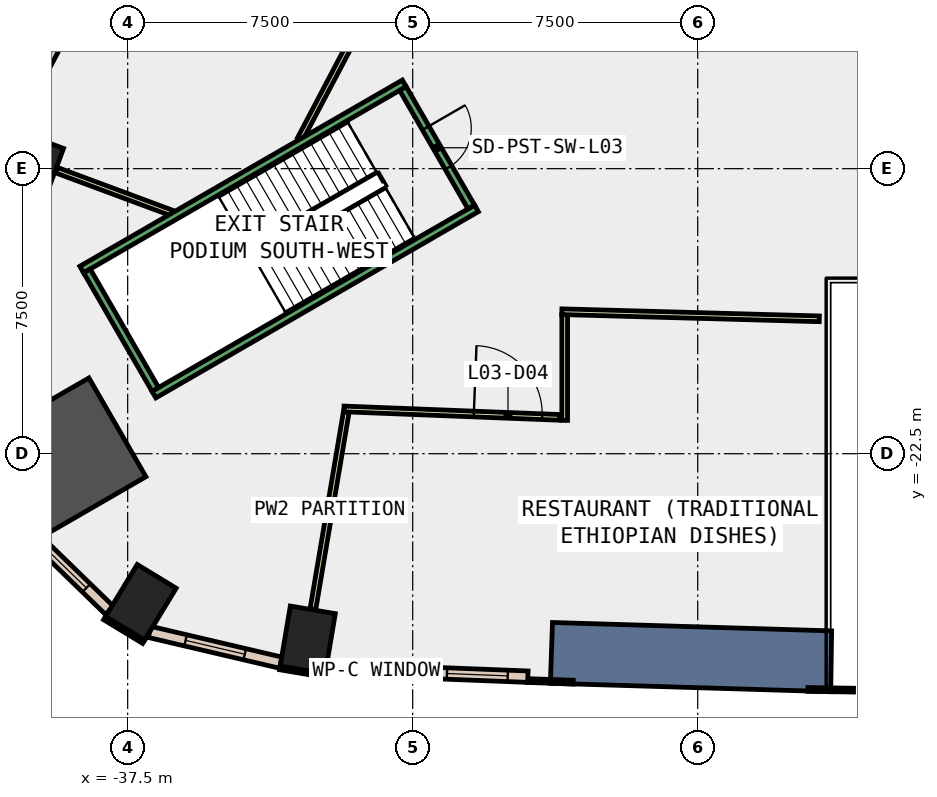
"""IFC4 building model, lengths in metres.
Left out: names, types, materials, properties, quantities, classifications, styles, units other than length and angle.
Written with IfcOpenShell. Run it as: python <this file> out.ifc"""

import sys

from ifc_helpers import new_model, si_unit, direction, frame, frame_2d, origin, origin_2d, place, context, subcontext, project, spatial, polyline, rectangle, outline, extrude, element, fill, save


model = new_model("IFC4")
c1 = context("Model", 3, precision=1e-05, world=origin(), true_north=direction((0.0, 1.0)))
c2 = subcontext(c1, "Body", "Model", "MODEL_VIEW")
j1 = project(units=[si_unit("LENGTHUNIT", "METRE"), si_unit("PLANEANGLEUNIT", "RADIAN")], contexts=[c1])
p1 = place(None, origin())
s1 = spatial("IfcSite", under=j1, at=p1, CompositionType="ELEMENT")
p2 = place(p1, origin())
s2 = spatial("IfcBuilding", under=s1, at=p2, CompositionType="ELEMENT")
p3 = place(p2, frame((0.0, 0.0, 20.0)))
s3 = spatial("IfcBuildingStorey", under=s2, at=p3, CompositionType="ELEMENT", Elevation=20.0)
for number, where, z_axis, x_axis in (
    (1, (-32.761, -27.397, -0.45), (0.0, 0.0, 1.0), (-0.986, 0.167, 0.0)),
    (2, (-40.147, -14.751, -0.45), (0.0, 0.0, 1.0), (0.348, 0.937, 0.0)),
):
    element("IfcColumn", number, at=place(p3, frame(where, z_axis=z_axis, x_axis=x_axis)), inside=s3, PredefinedType="COLUMN", context=c2, shape_type="SweptSolid", body=[
        extrude(rectangle(XDim=1.2, YDim=1.6, at=origin_2d()), origin(), (0.0, 0.0, 1.0), 5.0),
    ])
p4 = place(p3, frame((-39.069, -22.556, -0.45), z_axis=(0.0, 0.0, 1.0), x_axis=(0.866025403784, 0.5, 0.0)))
e3 = element("IfcColumn", 3, at=p4, inside=s3, PredefinedType="COLUMN", context=c2, shape_type="SweptSolid", body=[
    extrude(rectangle(XDim=3.0, YDim=3.0, at=origin_2d()), origin(), (0.0, 0.0, 1.0), 5.0),
])
p5 = place(p3, frame((-37.152, -26.411, -0.45), z_axis=(0.0, 0.0, 1.0), x_axis=(-0.854522294989, 0.519414716163, 0.0)))
e4 = element("IfcColumn", 4, at=p5, inside=s3, PredefinedType="COLUMN", context=c2, shape_type="SweptSolid", body=[
    extrude(rectangle(XDim=1.2, YDim=1.6, at=origin_2d()), origin(), (0.0, 0.0, 1.0), 5.0),
])
p6 = place(p3, frame((0.0, 0.0, -0.45)))
e5 = element("IfcWall", 5, at=p6, inside=s3, PredefinedType="SHEAR", context=c2, shape_type="SweptSolid", body=[
    extrude(outline(polyline([(-26.377, -28.54), (-19.0, -28.762), (-18.976, -27.162), (-26.321, -26.941), (-26.377, -28.54)])), origin(), (0.0, 0.0, 1.0), 5.0),
])
p7 = place(p3, frame((-33.494, -28.135, 0.0), z_axis=(0.0, 0.0, 1.0), x_axis=(0.986011774526, -0.166675674579, 0.0)))
e6 = element("IfcWall", 6, at=p7, inside=s3, PredefinedType="STANDARD", context=c2, shape_type="SweptSolid", body=[
    extrude(rectangle(XDim=1.2, YDim=0.1, at=frame_2d((0.6, 0.0))), origin(), (0.0, 0.0, 1.0), 4.55),
])
p8 = place(p3, frame((-26.975, -28.469, 0.0), z_axis=(0.0, 0.0, 1.0), x_axis=(0.999387493042, -0.034994838926, 0.0)))
e7 = element("IfcWall", 7, at=p8, inside=s3, PredefinedType="STANDARD", context=c2, shape_type="SweptSolid", body=[
    extrude(rectangle(XDim=1.2, YDim=0.1, at=frame_2d((0.6, 0.0))), origin(), (0.0, 0.0, 1.0), 4.55),
])
p9 = place(p3, frame((-19.599, -28.703, 0.0), z_axis=(0.0, 0.0, 1.0), x_axis=(0.999886724523, -0.015051183404, 0.0)))
e8 = element("IfcWall", 8, at=p9, inside=s3, PredefinedType="STANDARD", context=c2, shape_type="SweptSolid", body=[
    extrude(rectangle(XDim=1.2, YDim=0.1, at=frame_2d((0.6, 0.0))), origin(), (0.0, 0.0, 1.0), 4.55),
])
p10 = place(p3, frame((-38.106, -26.826, 0.0), z_axis=(0.0, 0.0, 1.0), x_axis=(0.854716608594, -0.519094903649, 0.0)))
e9 = element("IfcWall", 9, at=p10, inside=s3, PredefinedType="STANDARD", context=c2, shape_type="SweptSolid", body=[
    extrude(rectangle(XDim=1.2, YDim=0.1, at=frame_2d((0.6, 0.0))), origin(), (0.0, 0.0, 1.0), 4.55),
])
p11 = place(p3, frame((-32.282, -28.159, 0.0), z_axis=(0.0, 0.0, 1.0), x_axis=(0.999234205654, -0.039128023863, 0.0)))
e10 = element("IfcWall", 10, at=p11, inside=s3, PredefinedType="STANDARD", context=c2, shape_type="SweptSolid", body=[
    extrude(rectangle(XDim=5.316, YDim=0.3, at=frame_2d((2.658, 0.0))), origin(), (0.0, 0.0, 1.0), 4.55),
])
p12 = place(p11, frame((0.529, 0.0, 1.0)))
e11 = element("IfcOpeningElement", 11, at=p12, cuts=e10, PredefinedType="OPENING", context=c2, shape_type="SweptSolid", body=[
    extrude(rectangle(XDim=1.6, YDim=3.2, at=frame_2d((0.8, 1.6))), frame((0.0, 0.16, 0.0), z_axis=(0.0, -1.0, 0.0), x_axis=(1.0, 0.0, 0.0)), (0.0, 0.0, 1.0), 0.32),
])
p13 = place(p11, frame((3.187, 0.0, 1.0)))
e12 = element("IfcOpeningElement", 12, at=p13, cuts=e10, PredefinedType="OPENING", context=c2, shape_type="SweptSolid", body=[
    extrude(rectangle(XDim=1.6, YDim=3.2, at=frame_2d((0.8, 1.6))), frame((0.0, 0.16, 0.0), z_axis=(0.0, -1.0, 0.0), x_axis=(1.0, 0.0, 0.0)), (0.0, 0.0, 1.0), 0.32),
])
p14 = place(p3, frame((-37.695, -8.503, 0.0), z_axis=(0.0, 0.0, 1.0), x_axis=(-0.466125129602, -0.884718804792, 0.0)))
e13 = element("IfcWall", 13, at=p14, inside=s3, PredefinedType="STANDARD", context=c2, shape_type="SweptSolid", body=[
    extrude(rectangle(XDim=6.164, YDim=0.3, at=frame_2d((3.082, 0.0))), origin(), (0.0, 0.0, 1.0), 4.55),
])
p15 = place(p14, frame((0.541, 0.0, 1.0)))
e14 = element("IfcOpeningElement", 14, at=p15, cuts=e13, PredefinedType="OPENING", context=c2, shape_type="SweptSolid", body=[
    extrude(rectangle(XDim=2.0, YDim=3.2, at=frame_2d((1.0, 1.6))), frame((0.0, 0.16, 0.0), z_axis=(0.0, -1.0, 0.0), x_axis=(1.0, 0.0, 0.0)), (0.0, 0.0, 1.0), 0.32),
])
p16 = place(p14, frame((3.623, 0.0, 1.0)))
e15 = element("IfcOpeningElement", 15, at=p16, cuts=e13, PredefinedType="OPENING", context=c2, shape_type="SweptSolid", body=[
    extrude(rectangle(XDim=2.0, YDim=3.2, at=frame_2d((1.0, 1.6))), frame((0.0, 0.16, 0.0), z_axis=(0.0, -1.0, 0.0), x_axis=(1.0, 0.0, 0.0)), (0.0, 0.0, 1.0), 0.32),
])
p17 = place(p3, frame((-40.341, -24.329, 0.0), z_axis=(0.0, 0.0, 1.0), x_axis=(0.717527250225, -0.696530433782, 0.0)))
e16 = element("IfcWall", 16, at=p17, inside=s3, PredefinedType="STANDARD", context=c2, shape_type="SweptSolid", body=[
    extrude(rectangle(XDim=3.291, YDim=0.3, at=frame_2d((1.645, 0.0))), origin(), (0.0, 0.0, 1.0), 4.55),
])
p18 = place(p17, frame((0.845, 0.0, 1.0)))
e17 = element("IfcOpeningElement", 17, at=p18, cuts=e16, PredefinedType="OPENING", context=c2, shape_type="SweptSolid", body=[
    extrude(rectangle(XDim=1.6, YDim=3.2, at=frame_2d((0.8, 1.6))), frame((0.0, 0.16, 0.0), z_axis=(0.0, -1.0, 0.0), x_axis=(1.0, 0.0, 0.0)), (0.0, 0.0, 1.0), 0.32),
])
p19 = place(p3, frame((-36.923, -27.189, 0.0), z_axis=(0.0, 0.0, 1.0), x_axis=(0.97357041301, -0.228387063799, 0.0)))
e18 = element("IfcWall", 18, at=p19, inside=s3, PredefinedType="STANDARD", context=c2, shape_type="SweptSolid", body=[
    extrude(rectangle(XDim=3.547, YDim=0.3, at=frame_2d((1.773, 0.0))), origin(), (0.0, 0.0, 1.0), 4.55),
])
p20 = place(p19, frame((0.973, 0.0, 1.0)))
e19 = element("IfcOpeningElement", 19, at=p20, cuts=e18, PredefinedType="OPENING", context=c2, shape_type="SweptSolid", body=[
    extrude(rectangle(XDim=1.6, YDim=3.2, at=frame_2d((0.8, 1.6))), frame((0.0, 0.16, 0.0), z_axis=(0.0, -1.0, 0.0), x_axis=(1.0, 0.0, 0.0)), (0.0, 0.0, 1.0), 0.32),
])
p21 = place(p3, frame((-32.625, -26.588, 0.0), z_axis=(0.0, 0.0, 1.0), x_axis=(0.166820836651, 0.985987225302, 0.0)))
e20 = element("IfcWall", 20, at=p21, inside=s3, PredefinedType="PARTITIONING", context=c2, shape_type="SweptSolid", body=[
    extrude(rectangle(XDim=5.263, YDim=0.15, at=frame_2d((2.631, 0.0))), origin(), (0.0, 0.0, 1.0), 4.55),
])
p22 = place(p3, frame((-31.809, -21.322, 0.0), z_axis=(0.0, 0.0, 1.0), x_axis=(0.999236005504, -0.039082033002, 0.0)))
e21 = element("IfcWall", 21, at=p22, inside=s3, PredefinedType="PARTITIONING", context=c2, shape_type="SweptSolid", body=[
    extrude(rectangle(XDim=5.678, YDim=0.15, at=frame_2d((2.839, 0.0))), origin(), (0.0, 0.0, 1.0), 4.55),
])
p23 = place(p22, frame((3.42, 0.0, 0.0)))
e22 = element("IfcOpeningElement", 22, at=p23, cuts=e21, PredefinedType="OPENING", context=c2, shape_type="SweptSolid", body=[
    extrude(rectangle(XDim=1.8, YDim=2.1, at=frame_2d((0.9, 1.05))), frame((0.0, 0.085, 0.0), z_axis=(0.0, -1.0, 0.0), x_axis=(1.0, 0.0, 0.0)), (0.0, 0.0, 1.0), 0.17),
])
p24 = place(p3, frame((-26.0, -21.623, 0.0), z_axis=(0.0, 0.0, 1.0), x_axis=(0.0, 1.0, 0.0)))
e23 = element("IfcWall", 23, at=p24, inside=s3, PredefinedType="PARTITIONING", context=c2, shape_type="SweptSolid", body=[
    extrude(rectangle(XDim=2.782, YDim=0.15, at=frame_2d((1.391, 0.0))), origin(), (0.0, 0.0, 1.0), 4.55),
])
p25 = place(p3, frame((-26.075, -18.764, 0.0), z_axis=(0.0, 0.0, 1.0), x_axis=(0.999619238114, -0.027593093203, 0.0)))
e24 = element("IfcWall", 24, at=p25, inside=s3, PredefinedType="PARTITIONING", context=c2, shape_type="SweptSolid", body=[
    extrude(rectangle(XDim=6.778, YDim=0.15, at=frame_2d((3.389, 0.0))), origin(), (0.0, 0.0, 1.0), 4.55),
])
p26 = place(p3, frame((-31.371, -11.196, 0.0), z_axis=(0.0, 0.0, 1.0), x_axis=(-0.465955257404, -0.884808283244, 0.0)))
e25 = element("IfcWall", 25, at=p26, inside=s3, PredefinedType="PARTITIONING", context=c2, shape_type="SweptSolid", body=[
    extrude(rectangle(XDim=3.421, YDim=0.15, at=frame_2d((1.71, 0.0))), origin(), (0.0, 0.0, 1.0), 4.55),
])
p27 = place(p3, frame((-36.334, -16.168, 0.0), z_axis=(0.0, 0.0, 1.0), x_axis=(-0.937400028274, 0.348254485961, 0.0)))
e26 = element("IfcWall", 26, at=p27, inside=s3, PredefinedType="PARTITIONING", context=c2, shape_type="SweptSolid", body=[
    extrude(rectangle(XDim=3.247, YDim=0.15, at=frame_2d((1.624, 0.0))), origin(), (0.0, 0.0, 1.0), 4.55),
])
for number, where, z_axis, x_axis in (
    (27, (-30.222, -12.755, 0.0), (0.0, 0.0, 1.0), (-0.866, -0.5, 0.0)),
    (28, (-28.322, -16.045, 0.0), (0.0, 0.0, 1.0), (-0.866, -0.5, 0.0)),
):
    element("IfcWall", number, at=place(p3, frame(where, z_axis=z_axis, x_axis=x_axis)), inside=s3, PredefinedType="STANDARD", context=c2, shape_type="SweptSolid", body=[
        extrude(rectangle(XDim=9.8, YDim=0.2, at=frame_2d((4.9, 0.0))), origin(), (0.0, 0.0, 1.0), 4.55),
    ])
p28 = place(p3, frame((-30.258, -12.891, 0.0), z_axis=(0.0, 0.0, 1.0), x_axis=(0.499982693035, -0.866035395735, 0.0)))
e29 = element("IfcWall", 29, at=p28, inside=s3, PredefinedType="STANDARD", context=c2, shape_type="SweptSolid", body=[
    extrude(rectangle(XDim=3.6, YDim=0.2, at=frame_2d((1.8, 0.0))), origin(), (0.0, 0.0, 1.0), 4.55),
])
p29 = place(p28, frame((1.2, 0.0, 0.0)))
e30 = element("IfcOpeningElement", 30, at=p29, cuts=e29, PredefinedType="OPENING", context=c2, shape_type="SweptSolid", body=[
    extrude(rectangle(XDim=1.2, YDim=2.2, at=frame_2d((0.6, 1.1))), frame((0.0, 0.11, 0.0), z_axis=(0.0, -1.0, 0.0), x_axis=(1.0, 0.0, 0.0)), (0.0, 0.0, 1.0), 0.22),
])
p30 = place(p3, frame((-38.572, -17.691, 0.0), z_axis=(0.0, 0.0, 1.0), x_axis=(0.49995333141, -0.866052346231, 0.0)))
e31 = element("IfcWall", 31, at=p30, inside=s3, PredefinedType="STANDARD", context=c2, shape_type="SweptSolid", body=[
    extrude(rectangle(XDim=3.6, YDim=0.2, at=frame_2d((1.8, 0.0))), origin(), (0.0, 0.0, 1.0), 4.55),
])
p31 = place(p12, origin())
e32 = element("IfcWindow", 32, at=p31, inside=s3, PartitioningType="SINGLE_PANEL", PredefinedType="WINDOW", context=c2, shape_type="SweptSolid", body=[
    extrude(rectangle(XDim=1.6, YDim=3.2, at=frame_2d((0.8, 1.6))), frame((0.0, 0.03, 0.0), z_axis=(0.0, -1.0, 0.0), x_axis=(1.0, 0.0, 0.0)), (0.0, 0.0, 1.0), 0.06),
])
fill(e11, e32)
p32 = place(p13, origin())
e33 = element("IfcWindow", 33, at=p32, inside=s3, PartitioningType="SINGLE_PANEL", PredefinedType="WINDOW", context=c2, shape_type="SweptSolid", body=[
    extrude(rectangle(XDim=1.6, YDim=3.2, at=frame_2d((0.8, 1.6))), frame((0.0, 0.03, 0.0), z_axis=(0.0, -1.0, 0.0), x_axis=(1.0, 0.0, 0.0)), (0.0, 0.0, 1.0), 0.06),
])
fill(e12, e33)
p33 = place(p16, origin())
e34 = element("IfcWindow", 34, at=p33, inside=s3, PartitioningType="SINGLE_PANEL", PredefinedType="WINDOW", context=c2, shape_type="SweptSolid", body=[
    extrude(rectangle(XDim=2.0, YDim=3.2, at=frame_2d((1.0, 1.6))), frame((0.0, 0.03, 0.0), z_axis=(0.0, -1.0, 0.0), x_axis=(1.0, 0.0, 0.0)), (0.0, 0.0, 1.0), 0.06),
])
fill(e15, e34)
p34 = place(p18, origin())
e35 = element("IfcWindow", 35, at=p34, inside=s3, PartitioningType="SINGLE_PANEL", PredefinedType="WINDOW", context=c2, shape_type="SweptSolid", body=[
    extrude(rectangle(XDim=1.6, YDim=3.2, at=frame_2d((0.8, 1.6))), frame((0.0, 0.03, 0.0), z_axis=(0.0, -1.0, 0.0), x_axis=(1.0, 0.0, 0.0)), (0.0, 0.0, 1.0), 0.06),
])
fill(e17, e35)
p35 = place(p20, origin())
e36 = element("IfcWindow", 36, at=p35, inside=s3, PartitioningType="SINGLE_PANEL", PredefinedType="WINDOW", context=c2, shape_type="SweptSolid", body=[
    extrude(rectangle(XDim=1.6, YDim=3.2, at=frame_2d((0.8, 1.6))), frame((0.0, 0.03, 0.0), z_axis=(0.0, -1.0, 0.0), x_axis=(1.0, 0.0, 0.0)), (0.0, 0.0, 1.0), 0.06),
])
fill(e19, e36)
p36 = place(p23, origin())
e37 = element("IfcDoor", 37, at=p36, inside=s3, OperationType="DOUBLE_DOOR_SINGLE_SWING", PredefinedType="DOOR", context=c2, shape_type="SweptSolid", body=[
    extrude(rectangle(XDim=1.8, YDim=2.1, at=frame_2d((0.9, 1.05))), frame((0.0, 0.025, 0.0), z_axis=(0.0, -1.0, 0.0), x_axis=(1.0, 0.0, 0.0)), (0.0, 0.0, 1.0), 0.05),
])
fill(e22, e37)
p37 = place(p29, origin())
e38 = element("IfcDoor", 38, at=p37, inside=s3, OperationType="SINGLE_SWING_LEFT", PredefinedType="DOOR", context=c2, shape_type="SweptSolid", body=[
    extrude(rectangle(XDim=1.2, YDim=2.2, at=frame_2d((0.6, 1.1))), frame((0.0, 0.025, 0.0), z_axis=(0.0, -1.0, 0.0), x_axis=(1.0, 0.0, 0.0)), (0.0, 0.0, 1.0), 0.05),
])
fill(e30, e38)
save(model, sys.argv[1])
